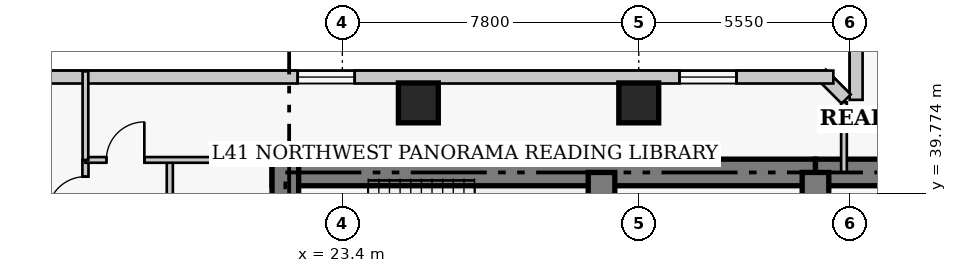
"""IFC4 building model, lengths in metres.
Left out: names, types, materials, properties, quantities, classifications, styles, units other than length and angle.
Written with IfcOpenShell. Run it as: python <this file> out.ifc"""

import sys

from ifc_helpers import new_model, si_unit, direction, frame, frame_2d, origin, origin_2d, place, context, subcontext, project, spatial, rectangle, extrude, element, fill, save


model = new_model("IFC4")
c1 = context("Model", 3, precision=1e-05, world=origin(), true_north=direction((0.0, 1.0)))
c2 = subcontext(c1, "Body", "Model", "MODEL_VIEW")
j1 = project(units=[si_unit("LENGTHUNIT", "METRE"), si_unit("PLANEANGLEUNIT", "RADIAN")], contexts=[c1])
p1 = place(None, origin())
s1 = spatial("IfcSite", under=j1, at=p1, CompositionType="ELEMENT")
p2 = place(p1, origin())
s2 = spatial("IfcBuilding", under=s1, at=p2, CompositionType="ELEMENT")
p3 = place(p2, frame((0.0, 0.0, 165.0)))
s3 = spatial("IfcBuildingStorey", under=s2, at=p3, CompositionType="ELEMENT", Elevation=165.0)
p4 = place(p3, frame((21.55, 40.32, 0.0), z_axis=(0.0, 0.0, 1.0), x_axis=(1.0, 0.0, 0.0)))
e1 = element("IfcWall", 1, at=p4, inside=s3, PredefinedType="SHEAR", context=c2, shape_type="SweptSolid", body=[
    extrude(rectangle(XDim=14.3, YDim=0.7, at=frame_2d((7.15, 0.0))), origin(), (0.0, 0.0, 1.0), 3.8),
])
p5 = place(p3, frame((35.85, 40.32, 0.0), z_axis=(0.0, 0.0, 1.0), x_axis=(1.0, 0.0, 0.0)))
e2 = element("IfcWall", 2, at=p5, inside=s3, PredefinedType="SHEAR", context=c2, shape_type="SweptSolid", body=[
    extrude(rectangle(XDim=12.6, YDim=0.7, at=frame_2d((6.3, 0.0))), origin(), (0.0, 0.0, 1.0), 3.8),
])
p6 = place(p3, frame((21.9, 27.05, 0.0), z_axis=(0.0, 0.0, 1.0), x_axis=(0.0, 1.0, 0.0)))
e3 = element("IfcWall", 3, at=p6, inside=s3, PredefinedType="SHEAR", context=c2, shape_type="SweptSolid", body=[
    extrude(rectangle(XDim=13.62, YDim=0.7, at=frame_2d((6.81, 0.0))), origin(), (0.0, 0.0, 1.0), 3.8),
])
p7 = place(p3, frame((30.22, 33.1, 0.0), z_axis=(0.0, 0.0, 1.0), x_axis=(0.0, 1.0, 0.0)))
e4 = element("IfcWall", 4, at=p7, inside=s3, PredefinedType="SHEAR", context=c2, shape_type="SweptSolid", body=[
    extrude(rectangle(XDim=7.22, YDim=0.7, at=frame_2d((3.61, 0.0))), origin(), (0.0, 0.0, 1.0), 3.8),
])
p8 = place(p3, frame((35.85, 36.37, 0.0), z_axis=(0.0, 0.0, 1.0), x_axis=(0.0, 1.0, 0.0)))
e5 = element("IfcWall", 5, at=p8, inside=s3, PredefinedType="SHEAR", context=c2, shape_type="SweptSolid", body=[
    extrude(rectangle(XDim=3.95, YDim=0.7, at=frame_2d((1.975, 0.0))), origin(), (0.0, 0.0, 1.0), 3.8),
])
p9 = place(p8, frame((0.88, 0.0, 0.0)))
e6 = element("IfcOpeningElement", 6, at=p9, cuts=e5, PredefinedType="OPENING", context=c2, shape_type="SweptSolid", body=[
    extrude(rectangle(XDim=1.1, YDim=2.15, at=frame_2d((0.55, 1.075))), frame((0.0, 0.36, 0.0), z_axis=(0.0, -1.0, 0.0), x_axis=(1.0, 0.0, 0.0)), (0.0, 0.0, 1.0), 0.72),
])
for number, where, z_axis, x_axis in (
    (7, (25.4, 42.15, 0.0), (0.0, 0.0, 1.0), (1.0, 0.0, 0.0)),
    (8, (31.2, 42.15, 0.0), (0.0, 0.0, 1.0), (1.0, 0.0, 0.0)),
):
    element("IfcColumn", number, at=place(p3, frame(where, z_axis=z_axis, x_axis=x_axis)), inside=s3, PredefinedType="COLUMN", context=c2, shape_type="SweptSolid", body=[
        extrude(rectangle(XDim=1.05, YDim=1.05, at=origin_2d()), origin(), (0.0, 0.0, 1.0), 3.8),
    ])
p10 = place(p3, frame((36.92, 44.37, 0.0), z_axis=(0.0, 0.0, 1.0), x_axis=(0.0, -1.0, 0.0)))
e9 = element("IfcWall", 9, at=p10, inside=s3, PredefinedType="SOLIDWALL", context=c2, shape_type="SweptSolid", body=[
    extrude(rectangle(XDim=2.14, YDim=0.34, at=frame_2d((1.07, 0.0))), origin(), (0.0, 0.0, 1.0), 3.55),
])
p11 = place(p3, frame((36.658, 42.251, 0.0), z_axis=(0.0, 0.0, 1.0), x_axis=(-0.707106781187, 0.707106781187, 0.0)))
e10 = element("IfcWall", 10, at=p11, inside=s3, PredefinedType="SOLIDWALL", context=c2, shape_type="SweptSolid", body=[
    extrude(rectangle(XDim=0.929, YDim=0.34, at=frame_2d((0.464, 0.0))), origin(), (0.0, 0.0, 1.0), 3.55),
])
p12 = place(p3, frame((36.32, 42.83, 0.0), z_axis=(0.0, 0.0, 1.0), x_axis=(-1.0, 0.0, 0.0)))
e11 = element("IfcWall", 11, at=p12, inside=s3, PredefinedType="SOLIDWALL", context=c2, shape_type="SweptSolid", body=[
    extrude(rectangle(XDim=26.69, YDim=0.34, at=frame_2d((13.345, 0.0))), origin(), (0.0, 0.0, 1.0), 3.55),
])
p13 = place(p12, frame((2.548, 0.0, 0.85)))
e12 = element("IfcOpeningElement", 12, at=p13, cuts=e11, PredefinedType="OPENING", context=c2, shape_type="SweptSolid", body=[
    extrude(rectangle(XDim=1.5, YDim=1.75, at=frame_2d((0.75, 0.875))), frame((0.0, 0.18, 0.0), z_axis=(0.0, -1.0, 0.0), x_axis=(1.0, 0.0, 0.0)), (0.0, 0.0, 1.0), 0.36),
])
p14 = place(p12, frame((12.595, 0.0, 0.85)))
e13 = element("IfcOpeningElement", 13, at=p14, cuts=e11, PredefinedType="OPENING", context=c2, shape_type="SweptSolid", body=[
    extrude(rectangle(XDim=1.5, YDim=1.75, at=frame_2d((0.75, 0.875))), frame((0.0, 0.18, 0.0), z_axis=(0.0, -1.0, 0.0), x_axis=(1.0, 0.0, 0.0)), (0.0, 0.0, 1.0), 0.36),
])
p15 = place(p12, frame((21.492, 0.0, 0.85)))
e14 = element("IfcOpeningElement", 14, at=p15, cuts=e11, PredefinedType="OPENING", context=c2, shape_type="SweptSolid", body=[
    extrude(rectangle(XDim=1.5, YDim=1.75, at=frame_2d((0.75, 0.875))), frame((0.0, 0.18, 0.0), z_axis=(0.0, -1.0, 0.0), x_axis=(1.0, 0.0, 0.0)), (0.0, 0.0, 1.0), 0.36),
])
p16 = place(p3, frame((16.64, 6.85, 0.0), z_axis=(0.0, 0.0, 1.0), x_axis=(0.0, 1.0, 0.0)))
e15 = element("IfcWall", 15, at=p16, inside=s3, PredefinedType="PARTITIONING", context=c2, shape_type="SweptSolid", body=[
    extrude(rectangle(XDim=33.8, YDim=0.16, at=frame_2d((16.9, 0.0))), origin(), (0.0, 0.0, 1.0), 3.55),
])
p17 = place(p16, frame((1.7, 0.0, 0.0)))
e16 = element("IfcOpeningElement", 16, at=p17, cuts=e15, PredefinedType="OPENING", context=c2, shape_type="SweptSolid", body=[
    extrude(rectangle(XDim=0.95, YDim=2.1, at=frame_2d((0.475, 1.05))), frame((0.0, 0.09, 0.0), z_axis=(0.0, -1.0, 0.0), x_axis=(1.0, 0.0, 0.0)), (0.0, 0.0, 1.0), 0.18),
])
p18 = place(p16, frame((8.275, 0.0, 0.0)))
e17 = element("IfcOpeningElement", 17, at=p18, cuts=e15, PredefinedType="OPENING", context=c2, shape_type="SweptSolid", body=[
    extrude(rectangle(XDim=0.95, YDim=2.1, at=frame_2d((0.475, 1.05))), frame((0.0, 0.09, 0.0), z_axis=(0.0, -1.0, 0.0), x_axis=(1.0, 0.0, 0.0)), (0.0, 0.0, 1.0), 0.18),
])
p19 = place(p16, frame((17.075, 0.0, 0.0)))
e18 = element("IfcOpeningElement", 18, at=p19, cuts=e15, PredefinedType="OPENING", context=c2, shape_type="SweptSolid", body=[
    extrude(rectangle(XDim=0.95, YDim=2.1, at=frame_2d((0.475, 1.05))), frame((0.0, 0.09, 0.0), z_axis=(0.0, -1.0, 0.0), x_axis=(1.0, 0.0, 0.0)), (0.0, 0.0, 1.0), 0.18),
])
p20 = place(p16, frame((25.125, 0.0, 0.0)))
e19 = element("IfcOpeningElement", 19, at=p20, cuts=e15, PredefinedType="OPENING", context=c2, shape_type="SweptSolid", body=[
    extrude(rectangle(XDim=0.95, YDim=2.1, at=frame_2d((0.475, 1.05))), frame((0.0, 0.09, 0.0), z_axis=(0.0, -1.0, 0.0), x_axis=(1.0, 0.0, 0.0)), (0.0, 0.0, 1.0), 0.18),
])
p21 = place(p16, frame((32.36, 0.0, 0.0)))
e20 = element("IfcOpeningElement", 20, at=p21, cuts=e15, PredefinedType="OPENING", context=c2, shape_type="SweptSolid", body=[
    extrude(rectangle(XDim=1.0, YDim=2.15, at=frame_2d((0.5, 1.075))), frame((0.0, 0.09, 0.0), z_axis=(0.0, -1.0, 0.0), x_axis=(1.0, 0.0, 0.0)), (0.0, 0.0, 1.0), 0.18),
])
p22 = place(p3, frame((18.86, 35.02, 0.0), z_axis=(0.0, 0.0, 1.0), x_axis=(0.0, 1.0, 0.0)))
e21 = element("IfcWall", 21, at=p22, inside=s3, PredefinedType="PARTITIONING", context=c2, shape_type="SweptSolid", body=[
    extrude(rectangle(XDim=5.63, YDim=0.16, at=frame_2d((2.815, 0.0))), origin(), (0.0, 0.0, 1.0), 3.55),
])
p23 = place(p3, frame((16.64, 40.65, 0.0), z_axis=(0.0, 0.0, 1.0), x_axis=(1.0, 0.0, 0.0)))
e22 = element("IfcWall", 22, at=p23, inside=s3, PredefinedType="PARTITIONING", context=c2, shape_type="SweptSolid", body=[
    extrude(rectangle(XDim=5.46, YDim=0.15, at=frame_2d((2.73, 0.0))), origin(), (0.0, 0.0, 1.0), 3.55),
])
p24 = place(p23, frame((0.55, 0.0, 0.0)))
e23 = element("IfcOpeningElement", 23, at=p24, cuts=e22, PredefinedType="OPENING", context=c2, shape_type="SweptSolid", body=[
    extrude(rectangle(XDim=1.0, YDim=2.15, at=frame_2d((0.5, 1.075))), frame((0.0, 0.085, 0.0), z_axis=(0.0, -1.0, 0.0), x_axis=(1.0, 0.0, 0.0)), (0.0, 0.0, 1.0), 0.17),
])
p25 = place(p3, frame((16.64, 40.65, 0.0), z_axis=(0.0, 0.0, 1.0), x_axis=(0.0, 1.0, 0.0)))
e24 = element("IfcWall", 24, at=p25, inside=s3, PredefinedType="PARTITIONING", context=c2, shape_type="SweptSolid", body=[
    extrude(rectangle(XDim=2.33, YDim=0.15, at=frame_2d((1.165, 0.0))), origin(), (0.0, 0.0, 1.0), 3.55),
])
p26 = place(p3, frame((36.6, 40.32, 0.0), z_axis=(0.0, 0.0, 1.0), x_axis=(0.0, 1.0, 0.0)))
e25 = element("IfcWall", 25, at=p26, inside=s3, PredefinedType="PARTITIONING", context=c2, shape_type="SweptSolid", body=[
    extrude(rectangle(XDim=1.845, YDim=0.15, at=frame_2d((0.922, 0.0))), origin(), (0.0, 0.0, 1.0), 3.55),
])
p27 = place(p13, origin())
e26 = element("IfcWindow", 26, at=p27, inside=s3, PartitioningType="SINGLE_PANEL", PredefinedType="WINDOW", context=c2, shape_type="SweptSolid", body=[
    extrude(rectangle(XDim=1.5, YDim=1.75, at=frame_2d((0.75, 0.875))), frame((0.0, 0.03, 0.0), z_axis=(0.0, -1.0, 0.0), x_axis=(1.0, 0.0, 0.0)), (0.0, 0.0, 1.0), 0.06),
])
fill(e12, e26)
p28 = place(p14, origin())
e27 = element("IfcWindow", 27, at=p28, inside=s3, PartitioningType="SINGLE_PANEL", PredefinedType="WINDOW", context=c2, shape_type="SweptSolid", body=[
    extrude(rectangle(XDim=1.5, YDim=1.75, at=frame_2d((0.75, 0.875))), frame((0.0, 0.03, 0.0), z_axis=(0.0, -1.0, 0.0), x_axis=(1.0, 0.0, 0.0)), (0.0, 0.0, 1.0), 0.06),
])
fill(e13, e27)
p29 = place(p24, origin())
e28 = element("IfcDoor", 28, at=p29, inside=s3, OperationType="SINGLE_SWING_RIGHT", PredefinedType="DOOR", context=c2, shape_type="SweptSolid", body=[
    extrude(rectangle(XDim=1.0, YDim=2.15, at=frame_2d((0.5, 1.075))), frame((0.0, 0.025, 0.0), z_axis=(0.0, -1.0, 0.0), x_axis=(1.0, 0.0, 0.0)), (0.0, 0.0, 1.0), 0.05),
])
fill(e23, e28)
p30 = place(p21, origin())
e29 = element("IfcDoor", 29, at=p30, inside=s3, OperationType="SINGLE_SWING_LEFT", PredefinedType="DOOR", context=c2, shape_type="SweptSolid", body=[
    extrude(rectangle(XDim=1.0, YDim=2.15, at=frame_2d((0.5, 1.075))), frame((0.0, 0.025, 0.0), z_axis=(0.0, -1.0, 0.0), x_axis=(1.0, 0.0, 0.0)), (0.0, 0.0, 1.0), 0.05),
])
fill(e20, e29)
save(model, sys.argv[1])
